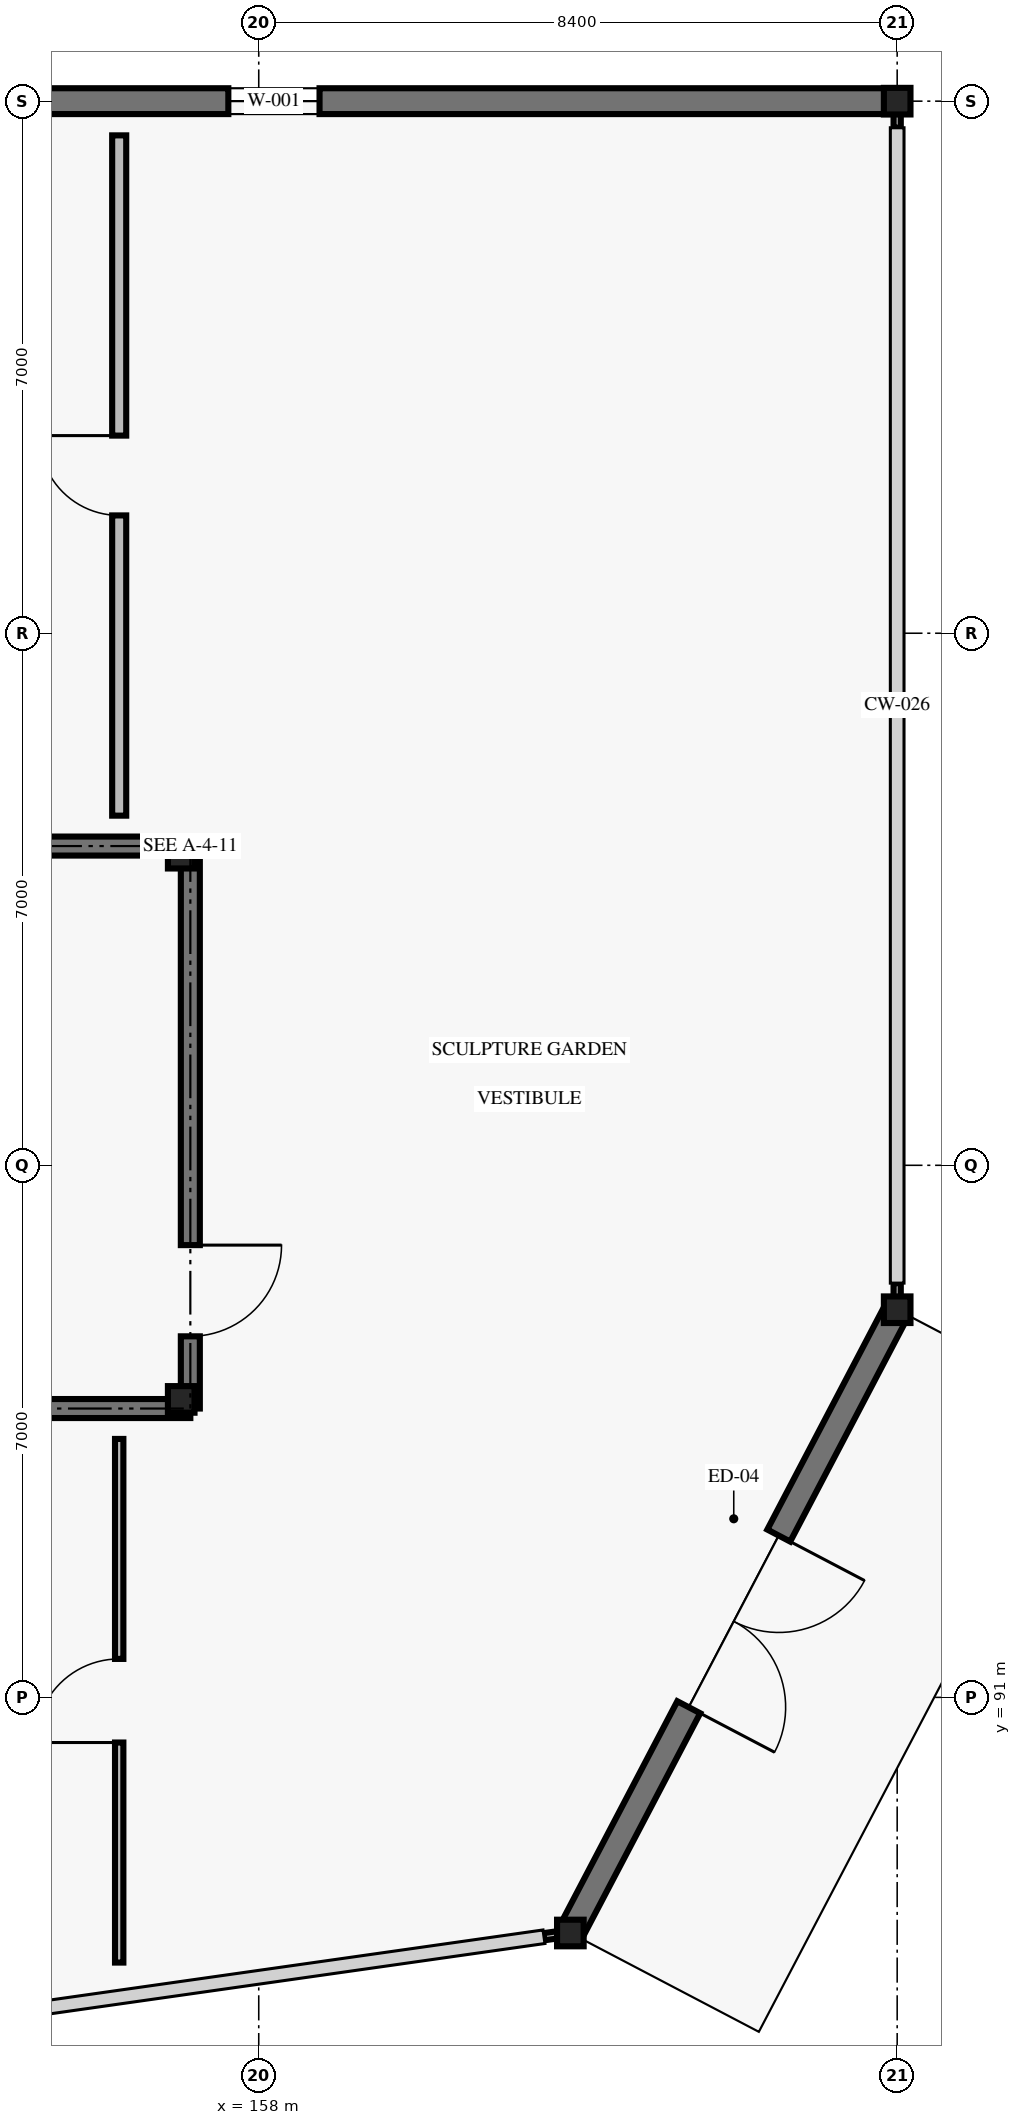
"""IFC4 building model, lengths in metres.
Left out: names, types, materials, properties, quantities, classifications, styles, units other than length and angle.
Written with IfcOpenShell. Run it as: python <this file> out.ifc"""

import sys

from ifc_helpers import new_model, si_unit, direction, frame, frame_2d, origin, origin_2d, place, context, subcontext, project, spatial, rectangle, i_section, extrude, element, fill, save


model = new_model("IFC4")
c1 = context("Model", 3, precision=1e-05, world=origin(), true_north=direction((0.0, 1.0)))
c2 = subcontext(c1, "Body", "Model", "MODEL_VIEW")
j1 = project(units=[si_unit("LENGTHUNIT", "METRE"), si_unit("PLANEANGLEUNIT", "RADIAN")], contexts=[c1])
p1 = place(None, origin())
s1 = spatial("IfcSite", under=j1, at=p1, CompositionType="ELEMENT")
p2 = place(p1, origin())
s2 = spatial("IfcBuilding", under=s1, at=p2, CompositionType="ELEMENT")
p3 = place(p2, origin())
s3 = spatial("IfcBuildingStorey", under=s2, at=p3, CompositionType="ELEMENT", Elevation=0.0)
for number, where, z_axis, x_axis in (
    (1, (162.1, 87.9, 0.0), (0.0, 0.0, 1.0), (1.0, 0.0, 0.0)),
    (2, (166.4, 96.1, 0.0), (0.0, 0.0, 1.0), (1.0, 0.0, 0.0)),
    (3, (166.4, 112.0, 0.0), (0.0, 0.0, 1.0), (1.0, 0.0, 0.0)),
    (4, (156.98, 94.92, 0.0), (0.0, 0.0, 1.0), (1.0, 0.0, 0.0)),
    (5, (156.98, 102.08, 0.0), (0.0, 0.0, 1.0), (1.0, 0.0, 0.0)),
):
    element("IfcColumn", number, at=place(p3, frame(where, z_axis=z_axis, x_axis=x_axis)), inside=s3, PredefinedType="COLUMN", context=c2, shape_type="SweptSolid", body=[
        extrude(i_section(OverallWidth=0.35, OverallDepth=0.35, WebThickness=0.02, FlangeThickness=0.028, at=origin_2d()), origin(), (0.0, 0.0, 1.0), 5.4),
    ])
p4 = place(p3, frame((162.058, 87.894, 0.0), z_axis=(0.0, 0.0, 1.0), x_axis=(-0.990232667812, -0.139424759628, 0.0)))
e6 = element("IfcWall", 6, at=p4, inside=s3, PredefinedType="SOLIDWALL", context=c2, shape_type="SweptSolid", body=[
    extrude(rectangle(XDim=0.308, YDim=0.095, at=frame_2d((0.154, 0.0))), origin(), (0.0, 0.0, 1.0), 4.22),
])
p5 = place(p3, frame((166.4, 96.1, 0.0), z_axis=(0.0, 0.0, 1.0), x_axis=(-0.464385293852, -0.885633275602, 0.0)))
e7 = element("IfcWall", 7, at=p5, inside=s3, PredefinedType="SOLIDWALL", context=c2, shape_type="SweptSolid", body=[
    extrude(rectangle(XDim=9.259, YDim=0.34, at=frame_2d((4.629, 0.0))), origin(), (0.0, 0.0, 1.0), 4.22),
])
p6 = place(p5, frame((3.355, 0.0, 0.0)))
e8 = element("IfcOpeningElement", 8, at=p6, cuts=e7, PredefinedType="OPENING", context=c2, shape_type="SweptSolid", body=[
    extrude(rectangle(XDim=2.55, YDim=2.5, at=frame_2d((1.275, 1.25))), frame((0.0, 0.18, 0.0), z_axis=(0.0, -1.0, 0.0), x_axis=(1.0, 0.0, 0.0)), (0.0, 0.0, 1.0), 0.36),
])
p7 = place(p3, frame((166.4, 111.958, 0.0), z_axis=(0.0, 0.0, 1.0), x_axis=(0.0, -1.0, 0.0)))
e9 = element("IfcWall", 9, at=p7, inside=s3, PredefinedType="SOLIDWALL", context=c2, shape_type="SweptSolid", body=[
    extrude(rectangle(XDim=0.308, YDim=0.095, at=frame_2d((0.154, 0.0))), origin(), (0.0, 0.0, 1.0), 4.22),
])
p8 = place(p3, frame((166.4, 96.45, 0.0), z_axis=(0.0, 0.0, 1.0), x_axis=(0.0, -1.0, 0.0)))
e10 = element("IfcWall", 10, at=p8, inside=s3, PredefinedType="SOLIDWALL", context=c2, shape_type="SweptSolid", body=[
    extrude(rectangle(XDim=0.308, YDim=0.095, at=frame_2d((0.154, 0.0))), origin(), (0.0, 0.0, 1.0), 4.22),
])
p9 = place(p3, frame((150.0, 112.0, 0.0), z_axis=(0.0, 0.0, 1.0), x_axis=(1.0, 0.0, 0.0)))
e11 = element("IfcWall", 11, at=p9, inside=s3, PredefinedType="SOLIDWALL", context=c2, shape_type="SweptSolid", body=[
    extrude(rectangle(XDim=16.4, YDim=0.34, at=frame_2d((8.2, 0.0))), origin(), (0.0, 0.0, 1.0), 4.22),
])
p10 = place(p9, frame((7.6, 0.0, 0.95)))
e12 = element("IfcOpeningElement", 12, at=p10, cuts=e11, PredefinedType="OPENING", context=c2, shape_type="SweptSolid", body=[
    extrude(rectangle(XDim=1.2, YDim=1.8, at=frame_2d((0.6, 0.9))), frame((0.0, 0.18, 0.0), z_axis=(0.0, -1.0, 0.0), x_axis=(1.0, 0.0, 0.0)), (0.0, 0.0, 1.0), 0.36),
])
p11 = place(p3, frame((156.164, 87.511, 0.0), z_axis=(0.0, 0.0, 1.0), x_axis=(0.0, 1.0, 0.0)))
e13 = element("IfcWall", 13, at=p11, inside=s3, PredefinedType="PARTITIONING", context=c2, shape_type="SweptSolid", body=[
    extrude(rectangle(XDim=6.889, YDim=0.11, at=frame_2d((3.444, 0.0))), origin(), (0.0, 0.0, 1.0), 3.92),
])
p12 = place(p11, frame((2.895, 0.0, 0.0)))
e14 = element("IfcOpeningElement", 14, at=p12, cuts=e13, PredefinedType="OPENING", context=c2, shape_type="SweptSolid", body=[
    extrude(rectangle(XDim=1.1, YDim=2.2, at=frame_2d((0.55, 1.1))), frame((0.0, 0.065, 0.0), z_axis=(0.0, -1.0, 0.0), x_axis=(1.0, 0.0, 0.0)), (0.0, 0.0, 1.0), 0.13),
])
p13 = place(p3, frame((156.164, 102.6, 0.0), z_axis=(0.0, 0.0, 1.0), x_axis=(0.0, 1.0, 0.0)))
e15 = element("IfcWall", 15, at=p13, inside=s3, PredefinedType="PARTITIONING", context=c2, shape_type="SweptSolid", body=[
    extrude(rectangle(XDim=8.95, YDim=0.185, at=frame_2d((4.475, 0.0))), origin(), (0.0, 0.0, 1.0), 3.92),
])
p14 = place(p13, frame((3.95, 0.0, 0.0)))
e16 = element("IfcOpeningElement", 16, at=p14, cuts=e15, PredefinedType="OPENING", context=c2, shape_type="SweptSolid", body=[
    extrude(rectangle(XDim=1.05, YDim=2.2, at=frame_2d((0.525, 1.1))), frame((0.0, 0.103, 0.0), z_axis=(0.0, -1.0, 0.0), x_axis=(1.0, 0.0, 0.0)), (0.0, 0.0, 1.0), 0.205),
])
for number, where, z_axis, x_axis in (
    (17, (147.9, 102.2, 0.0), (0.0, 0.0, 1.0), (1.0, 0.0, 0.0)),
    (18, (157.1, 94.8, 0.0), (0.0, 0.0, 1.0), (-1.0, 0.0, 0.0)),
):
    element("IfcWall", number, at=place(p3, frame(where, z_axis=z_axis, x_axis=x_axis)), inside=s3, PredefinedType="SHEAR", context=c2, shape_type="SweptSolid", body=[
        extrude(rectangle(XDim=9.2, YDim=0.25, at=frame_2d((4.6, 0.0))), origin(), (0.0, 0.0, 1.0), 5.16),
    ])
p15 = place(p3, frame((157.1, 102.2, 0.0), z_axis=(0.0, 0.0, 1.0), x_axis=(0.0, -1.0, 0.0)))
e19 = element("IfcWall", 19, at=p15, inside=s3, PredefinedType="SHEAR", context=c2, shape_type="SweptSolid", body=[
    extrude(rectangle(XDim=7.4, YDim=0.25, at=frame_2d((3.7, 0.0))), origin(), (0.0, 0.0, 1.0), 5.16),
])
p16 = place(p15, frame((5.25, 0.0, 0.0)))
e20 = element("IfcOpeningElement", 20, at=p16, cuts=e19, PredefinedType="OPENING", context=c2, shape_type="SweptSolid", body=[
    extrude(rectangle(XDim=1.2, YDim=2.2, at=frame_2d((0.6, 1.1))), frame((0.0, 0.135, 0.0), z_axis=(0.0, -1.0, 0.0), x_axis=(1.0, 0.0, 0.0)), (0.0, 0.0, 1.0), 0.27),
])
p17 = place(p6, origin())
e21 = element("IfcDoor", 21, at=p17, inside=s3, OperationType="DOUBLE_DOOR_SINGLE_SWING", PredefinedType="DOOR", context=c2, shape_type="SweptSolid", body=[
    extrude(rectangle(XDim=2.55, YDim=2.5, at=frame_2d((1.275, 1.25))), frame((0.0, 0.025, 0.0), z_axis=(0.0, -1.0, 0.0), x_axis=(1.0, 0.0, 0.0)), (0.0, 0.0, 1.0), 0.05),
])
fill(e8, e21)
p18 = place(p10, origin())
e22 = element("IfcWindow", 22, at=p18, inside=s3, PartitioningType="SINGLE_PANEL", PredefinedType="WINDOW", context=c2, shape_type="SweptSolid", body=[
    extrude(rectangle(XDim=1.2, YDim=1.8, at=frame_2d((0.6, 0.9))), frame((0.0, 0.03, 0.0), z_axis=(0.0, -1.0, 0.0), x_axis=(1.0, 0.0, 0.0)), (0.0, 0.0, 1.0), 0.06),
])
fill(e12, e22)
p19 = place(p12, origin())
e23 = element("IfcDoor", 23, at=p19, inside=s3, OperationType="SINGLE_SWING_LEFT", PredefinedType="DOOR", context=c2, shape_type="SweptSolid", body=[
    extrude(rectangle(XDim=1.1, YDim=2.2, at=frame_2d((0.55, 1.1))), frame((0.0, 0.025, 0.0), z_axis=(0.0, -1.0, 0.0), x_axis=(1.0, 0.0, 0.0)), (0.0, 0.0, 1.0), 0.05),
])
fill(e14, e23)
p20 = place(p14, origin())
e24 = element("IfcDoor", 24, at=p20, inside=s3, OperationType="SINGLE_SWING_RIGHT", PredefinedType="DOOR", context=c2, shape_type="SweptSolid", body=[
    extrude(rectangle(XDim=1.05, YDim=2.2, at=frame_2d((0.525, 1.1))), frame((0.0, 0.025, 0.0), z_axis=(0.0, -1.0, 0.0), x_axis=(1.0, 0.0, 0.0)), (0.0, 0.0, 1.0), 0.05),
])
fill(e16, e24)
p21 = place(p16, origin())
e25 = element("IfcDoor", 25, at=p21, inside=s3, OperationType="SINGLE_SWING_LEFT", PredefinedType="DOOR", context=c2, shape_type="SweptSolid", body=[
    extrude(rectangle(XDim=1.2, YDim=2.2, at=frame_2d((0.6, 1.1))), frame((0.0, 0.025, 0.0), z_axis=(0.0, -1.0, 0.0), x_axis=(1.0, 0.0, 0.0)), (0.0, 0.0, 1.0), 0.05),
])
fill(e20, e25)
save(model, sys.argv[1])
